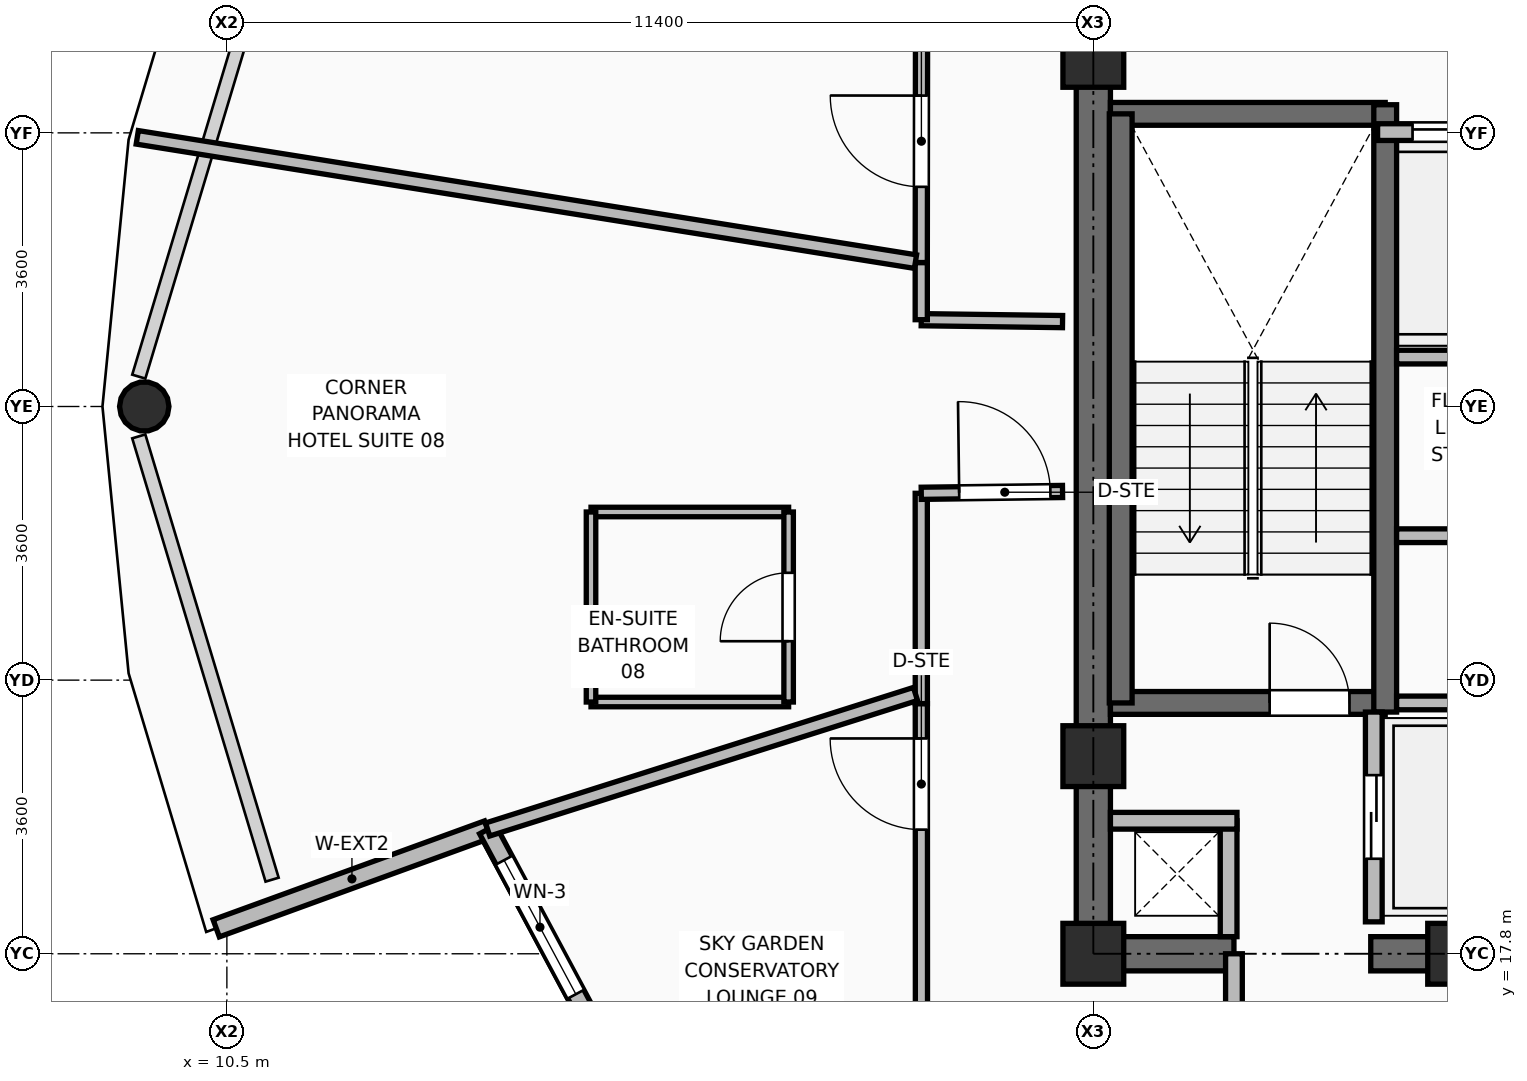
"""IFC4 building model, lengths in metres.
Left out: names, types, materials, properties, quantities, classifications, styles, units other than length and angle.
Written with IfcOpenShell. Run it as: python <this file> out.ifc"""

import sys

from ifc_helpers import new_model, si_unit, direction, frame, frame_2d, origin, origin_2d, place, context, subcontext, project, spatial, rectangle, hollow_circle, extrude, element, fill, save


model = new_model("IFC4")
c1 = context("Model", 3, precision=1e-05, world=origin(), true_north=direction((0.0, 1.0)))
c2 = subcontext(c1, "Body", "Model", "MODEL_VIEW")
j1 = project(units=[si_unit("LENGTHUNIT", "METRE"), si_unit("PLANEANGLEUNIT", "RADIAN")], contexts=[c1])
p1 = place(None, origin())
s1 = spatial("IfcSite", under=j1, at=p1, CompositionType="ELEMENT")
p2 = place(p1, origin())
s2 = spatial("IfcBuilding", under=s1, at=p2, CompositionType="ELEMENT")
p3 = place(p2, frame((0.0, 0.0, 216.15)))
s3 = spatial("IfcBuildingStorey", under=s2, at=p3, CompositionType="ELEMENT", Elevation=216.15)
for number, where, z_axis, x_axis in (
    (1, (21.9, 17.8, 0.0), (0.0, 0.0, 1.0), (1.0, 0.0, 0.0)),
    (2, (26.7, 17.8, 0.0), (0.0, 0.0, 1.0), (1.0, 0.0, 0.0)),
    (3, (21.9, 20.4, 0.0), (0.0, 0.0, 1.0), (1.0, 0.0, 0.0)),
    (4, (21.9, 29.6, 0.0), (0.0, 0.0, 1.0), (1.0, 0.0, 0.0)),
):
    element("IfcColumn", number, at=place(p3, frame(where, z_axis=z_axis, x_axis=x_axis)), inside=s3, PredefinedType="COLUMN", context=c2, shape_type="SweptSolid", body=[
        extrude(rectangle(XDim=0.8, YDim=0.8, at=origin_2d()), origin(), (0.0, 0.0, 1.0), 3.75),
    ])
p4 = place(p3, frame((9.413, 25.0, 0.0), z_axis=(0.020716335519, 0.0, 0.999785393693), x_axis=(0.0, 1.0, 0.0)))
e5 = element("IfcColumn", 5, at=p4, inside=s3, PredefinedType="COLUMN", context=c2, shape_type="SweptSolid", body=[
    extrude(hollow_circle(Radius=0.325, WallThickness=0.03, at=origin_2d()), origin(), (0.0, 0.0, 1.0), 3.571),
])
p5 = place(p3, frame((10.36, 18.135, 0.0), z_axis=(0.0, 0.0, 1.0), x_axis=(0.939660170892, 0.342109285519, 0.0)))
e6 = element("IfcWall", 6, at=p5, inside=s3, PredefinedType="SOLIDWALL", context=c2, shape_type="SweptSolid", body=[
    extrude(rectangle(XDim=3.8, YDim=0.24, at=frame_2d((1.9, 0.0))), origin(), (0.0, 0.0, 1.0), 3.57),
])
p6 = place(p3, frame((13.931, 19.435, 0.0), z_axis=(0.0, 0.0, 1.0), x_axis=(0.472181923686, -0.88150112362, 0.0)))
e7 = element("IfcWall", 7, at=p6, inside=s3, PredefinedType="SOLIDWALL", context=c2, shape_type="SweptSolid", body=[
    extrude(rectangle(XDim=2.917, YDim=0.24, at=frame_2d((1.458, 0.0))), origin(), (0.0, 0.0, 1.0), 3.57),
])
p7 = place(p6, frame((0.458, 0.0, 0.85)))
e8 = element("IfcOpeningElement", 8, at=p7, cuts=e7, PredefinedType="OPENING", context=c2, shape_type="SweptSolid", body=[
    extrude(rectangle(XDim=2.0, YDim=2.4, at=frame_2d((1.0, 1.2))), frame((0.0, 0.13, 0.0), z_axis=(0.0, -1.0, 0.0), x_axis=(1.0, 0.0, 0.0)), (0.0, 0.0, 1.0), 0.26),
])
p8 = place(p3, frame((21.675, 17.8, 0.0), z_axis=(0.0, 0.0, 1.0), x_axis=(1.0, 0.0, 0.0)))
e9 = element("IfcWall", 9, at=p8, inside=s3, PredefinedType="SHEAR", context=c2, shape_type="SweptSolid", body=[
    extrude(rectangle(XDim=2.075, YDim=0.45, at=frame_2d((1.038, 0.0))), origin(), (0.0, 0.0, 1.0), 3.57),
])
p9 = place(p3, frame((25.55, 17.8, 0.0), z_axis=(0.0, 0.0, 1.0), x_axis=(1.0, 0.0, 0.0)))
e10 = element("IfcWall", 10, at=p9, inside=s3, PredefinedType="SHEAR", context=c2, shape_type="SweptSolid", body=[
    extrude(rectangle(XDim=6.9, YDim=0.45, at=frame_2d((3.45, 0.0))), origin(), (0.0, 0.0, 1.0), 3.57),
])
p10 = place(p3, frame((21.9, 18.025, 0.0), z_axis=(0.0, 0.0, 1.0), x_axis=(0.0, 1.0, 0.0)))
e11 = element("IfcWall", 11, at=p10, inside=s3, PredefinedType="SHEAR", context=c2, shape_type="SweptSolid", body=[
    extrude(rectangle(XDim=14.2, YDim=0.45, at=frame_2d((7.1, 0.0))), origin(), (0.0, 0.0, 1.0), 3.57),
])
p11 = place(p3, frame((22.125, 21.1, 0.0), z_axis=(0.0, 0.0, 1.0), x_axis=(1.0, 0.0, 0.0)))
e12 = element("IfcWall", 12, at=p11, inside=s3, PredefinedType="SHEAR", context=c2, shape_type="SweptSolid", body=[
    extrude(rectangle(XDim=3.615, YDim=0.3, at=frame_2d((1.808, 0.0))), origin(), (0.0, 0.0, 1.0), 3.57),
])
p12 = place(p11, frame((2.095, 0.0, 0.0)))
e13 = element("IfcOpeningElement", 13, at=p12, cuts=e12, PredefinedType="OPENING", context=c2, shape_type="SweptSolid", body=[
    extrude(rectangle(XDim=1.05, YDim=2.1, at=frame_2d((0.525, 1.05))), frame((0.0, 0.16, 0.0), z_axis=(0.0, -1.0, 0.0), x_axis=(1.0, 0.0, 0.0)), (0.0, 0.0, 1.0), 0.32),
])
p13 = place(p3, frame((22.125, 28.85, 0.0), z_axis=(0.0, 0.0, 1.0), x_axis=(1.0, 0.0, 0.0)))
e14 = element("IfcWall", 14, at=p13, inside=s3, PredefinedType="SHEAR", context=c2, shape_type="SweptSolid", body=[
    extrude(rectangle(XDim=3.615, YDim=0.3, at=frame_2d((1.808, 0.0))), origin(), (0.0, 0.0, 1.0), 3.57),
])
p14 = place(p3, frame((25.74, 20.98, 0.0), z_axis=(0.0, 0.0, 1.0), x_axis=(0.0, 1.0, 0.0)))
e15 = element("IfcWall", 15, at=p14, inside=s3, PredefinedType="SHEAR", context=c2, shape_type="SweptSolid", body=[
    extrude(rectangle(XDim=7.99, YDim=0.3, at=frame_2d((3.995, 0.0))), origin(), (0.0, 0.0, 1.0), 3.57),
])
p15 = place(p3, frame((22.26, 21.1, 0.0), z_axis=(0.0, 0.0, 1.0), x_axis=(0.0, 1.0, 0.0)))
e16 = element("IfcWall", 16, at=p15, inside=s3, PredefinedType="SHEAR", context=c2, shape_type="SweptSolid", body=[
    extrude(rectangle(XDim=7.75, YDim=0.3, at=frame_2d((3.875, 0.0))), origin(), (0.0, 0.0, 1.0), 3.57),
])
p16 = place(p3, frame((23.68, 18.025, 0.0), z_axis=(0.0, 0.0, 1.0), x_axis=(0.0, 1.0, 0.0)))
e17 = element("IfcWall", 17, at=p16, inside=s3, PredefinedType="PARTITIONING", context=c2, shape_type="SweptSolid", body=[
    extrude(rectangle(XDim=1.525, YDim=0.22, at=frame_2d((0.763, 0.0))), origin(), (0.0, 0.0, 1.0), 3.55),
])
p17 = place(p3, frame((22.125, 19.55, 0.0), z_axis=(0.0, 0.0, 1.0), x_axis=(1.0, 0.0, 0.0)))
e18 = element("IfcWall", 18, at=p17, inside=s3, PredefinedType="PARTITIONING", context=c2, shape_type="SweptSolid", body=[
    extrude(rectangle(XDim=1.665, YDim=0.22, at=frame_2d((0.833, 0.0))), origin(), (0.0, 0.0, 1.0), 2.595),
])
p18 = place(p3, frame((25.59, 18.22, 0.0), z_axis=(0.0, 0.0, 1.0), x_axis=(0.0, 1.0, 0.0)))
e19 = element("IfcWall", 19, at=p18, inside=s3, PredefinedType="PARTITIONING", context=c2, shape_type="SweptSolid", body=[
    extrude(rectangle(XDim=2.76, YDim=0.22, at=frame_2d((1.38, 0.0))), origin(), (0.0, 0.0, 1.0), 3.55),
])
p19 = place(p18, frame((0.83, 0.0, 0.0)))
e20 = element("IfcOpeningElement", 20, at=p19, cuts=e19, PredefinedType="OPENING", context=c2, shape_type="SweptSolid", body=[
    extrude(rectangle(XDim=1.1, YDim=2.2, at=frame_2d((0.55, 1.1))), frame((0.0, 0.12, 0.0), z_axis=(0.0, -1.0, 0.0), x_axis=(1.0, 0.0, 0.0)), (0.0, 0.0, 1.0), 0.24),
])
p20 = place(p3, frame((25.64, 28.61, 0.0), z_axis=(0.0, 0.0, 1.0), x_axis=(1.0, 0.0, 0.0)))
e21 = element("IfcWall", 21, at=p20, inside=s3, PredefinedType="PARTITIONING", context=c2, shape_type="SweptSolid", body=[
    extrude(rectangle(XDim=2.02, YDim=0.22, at=frame_2d((1.01, 0.0))), origin(), (0.0, 0.0, 1.0), 3.55),
])
p21 = place(p20, frame((0.46, 0.0, 0.0)))
e22 = element("IfcOpeningElement", 22, at=p21, cuts=e21, PredefinedType="OPENING", context=c2, shape_type="SweptSolid", body=[
    extrude(rectangle(XDim=1.1, YDim=2.2, at=frame_2d((0.55, 1.1))), frame((0.0, 0.12, 0.0), z_axis=(0.0, -1.0, 0.0), x_axis=(1.0, 0.0, 0.0)), (0.0, 0.0, 1.0), 0.24),
])
for number, where, z_axis, x_axis in (
    (23, (25.89, 21.1, 0.0), (0.0, 0.0, 1.0), (1.0, 0.0, 0.0)),
    (24, (25.89, 25.65, 0.0), (0.0, 0.0, 1.0), (1.0, 0.0, 0.0)),
):
    element("IfcWall", number, at=place(p3, frame(where, z_axis=z_axis, x_axis=x_axis)), inside=s3, PredefinedType="PARTITIONING", context=c2, shape_type="SweptSolid", body=[
        extrude(rectangle(XDim=1.7, YDim=0.18, at=frame_2d((0.85, 0.0))), origin(), (0.0, 0.0, 1.0), 3.55),
    ])
p22 = place(p3, frame((25.89, 23.3, 0.0), z_axis=(0.0, 0.0, 1.0), x_axis=(1.0, 0.0, 0.0)))
e25 = element("IfcWall", 25, at=p22, inside=s3, PredefinedType="PARTITIONING", context=c2, shape_type="SweptSolid", body=[
    extrude(rectangle(XDim=1.79, YDim=0.18, at=frame_2d((0.895, 0.0))), origin(), (0.0, 0.0, 1.0), 3.55),
])
p23 = place(p3, frame((23.75, 14.35, 0.0), z_axis=(0.0, 0.0, 1.0), x_axis=(0.0, 1.0, 0.0)))
e26 = element("IfcWall", 26, at=p23, inside=s3, PredefinedType="PARTITIONING", context=c2, shape_type="SweptSolid", body=[
    extrude(rectangle(XDim=3.45, YDim=0.22, at=frame_2d((1.725, 0.0))), origin(), (0.0, 0.0, 1.0), 3.081),
])
p24 = place(p3, frame((21.495, 26.117, 0.0), z_axis=(0.0, 0.0, 1.0), x_axis=(-0.999908537082, 0.013524698532, 0.0)))
e27 = element("IfcWall", 27, at=p24, inside=s3, PredefinedType="PARTITIONING", context=c2, shape_type="SweptSolid", body=[
    extrude(rectangle(XDim=1.859, YDim=0.16, at=frame_2d((0.93, 0.0))), origin(), (0.0, 0.0, 1.0), 2.595),
])
p25 = place(p3, frame((19.636, 26.142, 0.0), z_axis=(0.0, 0.0, 1.0), x_axis=(0.0, 1.0, 0.0)))
e28 = element("IfcWall", 28, at=p25, inside=s3, PredefinedType="PARTITIONING", context=c2, shape_type="SweptSolid", body=[
    extrude(rectangle(XDim=0.752, YDim=0.16, at=frame_2d((0.376, 0.0))), origin(), (0.0, 0.0, 1.0), 3.55),
])
p26 = place(p3, frame((19.636, 26.894, 0.0), z_axis=(0.0, 0.0, 1.0), x_axis=(0.001172332137, 0.999999312818, 0.0)))
e29 = element("IfcWall", 29, at=p26, inside=s3, PredefinedType="PARTITIONING", context=c2, shape_type="SweptSolid", body=[
    extrude(rectangle(XDim=3.332, YDim=0.16, at=frame_2d((1.666, 0.0))), origin(), (0.0, 0.0, 1.0), 3.55),
])
p27 = place(p26, frame((0.996, 0.0, 0.0)))
e30 = element("IfcOpeningElement", 30, at=p27, cuts=e29, PredefinedType="OPENING", context=c2, shape_type="SweptSolid", body=[
    extrude(rectangle(XDim=1.2, YDim=2.1, at=frame_2d((0.6, 1.05))), frame((0.0, 0.09, 0.0), z_axis=(0.0, -1.0, 0.0), x_axis=(1.0, 0.0, 0.0)), (0.0, 0.0, 1.0), 0.18),
])
p28 = place(p3, frame((19.639, 15.545, 0.0), z_axis=(0.0, 0.0, 1.0), x_axis=(-0.000352159154, 0.999999937992, 0.0)))
e31 = element("IfcWall", 31, at=p28, inside=s3, PredefinedType="PARTITIONING", context=c2, shape_type="SweptSolid", body=[
    extrude(rectangle(XDim=5.546, YDim=0.16, at=frame_2d((2.773, 0.0))), origin(), (0.0, 0.0, 1.0), 3.081),
])
p29 = place(p28, frame((3.888, 0.0, 0.0)))
e32 = element("IfcOpeningElement", 32, at=p29, cuts=e31, PredefinedType="OPENING", context=c2, shape_type="SweptSolid", body=[
    extrude(rectangle(XDim=1.2, YDim=2.1, at=frame_2d((0.6, 1.05))), frame((0.0, 0.09, 0.0), z_axis=(0.0, -1.0, 0.0), x_axis=(1.0, 0.0, 0.0)), (0.0, 0.0, 1.0), 0.18),
])
p30 = place(p3, frame((19.637, 21.091, 0.0), z_axis=(0.0, 0.0, 1.0), x_axis=(-0.000352951535, 0.999999937713, 0.0)))
e33 = element("IfcWall", 33, at=p30, inside=s3, PredefinedType="PARTITIONING", context=c2, shape_type="SweptSolid", body=[
    extrude(rectangle(XDim=2.767, YDim=0.16, at=frame_2d((1.383, 0.0))), origin(), (0.0, 0.0, 1.0), 3.081),
])
p31 = place(p3, frame((19.636, 23.858, 0.0), z_axis=(0.0, 0.0, 1.0), x_axis=(0.999915502175, 0.012999558072, 0.0)))
e34 = element("IfcWall", 34, at=p31, inside=s3, PredefinedType="PARTITIONING", context=c2, shape_type="SweptSolid", body=[
    extrude(rectangle(XDim=1.859, YDim=0.16, at=frame_2d((0.93, 0.0))), origin(), (0.0, 0.0, 1.0), 2.595),
])
p32 = place(p31, frame((0.499, 0.0, 0.0)))
e35 = element("IfcOpeningElement", 35, at=p32, cuts=e34, PredefinedType="OPENING", context=c2, shape_type="SweptSolid", body=[
    extrude(rectangle(XDim=1.2, YDim=2.1, at=frame_2d((0.6, 1.05))), frame((0.0, 0.09, 0.0), z_axis=(0.0, -1.0, 0.0), x_axis=(1.0, 0.0, 0.0)), (0.0, 0.0, 1.0), 0.18),
])
p33 = place(p3, frame((19.56, 26.906, 0.0), z_axis=(0.0, 0.0, 1.0), x_axis=(-0.987489219608, 0.157686528141, 0.0)))
e36 = element("IfcWall", 36, at=p33, inside=s3, PredefinedType="PARTITIONING", context=c2, shape_type="SweptSolid", body=[
    extrude(rectangle(XDim=10.369, YDim=0.18, at=frame_2d((5.184, 0.0))), origin(), (0.0, 0.0, 1.0), 2.925),
])
p34 = place(p3, frame((19.56, 21.218, 0.0), z_axis=(0.0, 0.0, 1.0), x_axis=(-0.953322985511, -0.301952455358, 0.0)))
e37 = element("IfcWall", 37, at=p34, inside=s3, PredefinedType="PARTITIONING", context=c2, shape_type="SweptSolid", body=[
    extrude(rectangle(XDim=5.905, YDim=0.18, at=frame_2d((2.952, 0.0))), origin(), (0.0, 0.0, 1.0), 3.081),
])
for number, where, z_axis, x_axis in (
    (38, (15.291, 21.112, 0.0), (0.0, 0.0, 1.0), (1.0, 0.0, 0.0)),
    (39, (15.291, 23.612, 0.0), (0.0, 0.0, 1.0), (1.0, 0.0, 0.0)),
):
    element("IfcWall", number, at=place(p3, frame(where, z_axis=z_axis, x_axis=x_axis)), inside=s3, PredefinedType="PARTITIONING", context=c2, shape_type="SweptSolid", body=[
        extrude(rectangle(XDim=2.6, YDim=0.125, at=frame_2d((1.3, 0.0))), origin(), (0.0, 0.0, 1.0), 3.55),
    ])
p35 = place(p3, frame((15.291, 21.112, 0.0), z_axis=(0.0, 0.0, 1.0), x_axis=(0.0, 1.0, 0.0)))
e40 = element("IfcWall", 40, at=p35, inside=s3, PredefinedType="PARTITIONING", context=c2, shape_type="SweptSolid", body=[
    extrude(rectangle(XDim=2.5, YDim=0.125, at=frame_2d((1.25, 0.0))), origin(), (0.0, 0.0, 1.0), 3.081),
])
p36 = place(p3, frame((17.891, 21.112, 0.0), z_axis=(0.0, 0.0, 1.0), x_axis=(0.0, 1.0, 0.0)))
e41 = element("IfcWall", 41, at=p36, inside=s3, PredefinedType="PARTITIONING", context=c2, shape_type="SweptSolid", body=[
    extrude(rectangle(XDim=2.5, YDim=0.125, at=frame_2d((1.25, 0.0))), origin(), (0.0, 0.0, 1.0), 3.081),
])
p37 = place(p36, frame((0.8, 0.0, 0.0)))
e42 = element("IfcOpeningElement", 42, at=p37, cuts=e41, PredefinedType="OPENING", context=c2, shape_type="SweptSolid", body=[
    extrude(rectangle(XDim=0.9, YDim=2.1, at=frame_2d((0.45, 1.05))), frame((0.0, 0.073, 0.0), z_axis=(0.0, -1.0, 0.0), x_axis=(1.0, 0.0, 0.0)), (0.0, 0.0, 1.0), 0.145),
])
p38 = place(p7, origin())
e43 = element("IfcWindow", 43, at=p38, inside=s3, PartitioningType="SINGLE_PANEL", PredefinedType="WINDOW", context=c2, shape_type="SweptSolid", body=[
    extrude(rectangle(XDim=2.0, YDim=2.4, at=frame_2d((1.0, 1.2))), frame((0.0, 0.03, 0.0), z_axis=(0.0, -1.0, 0.0), x_axis=(1.0, 0.0, 0.0)), (0.0, 0.0, 1.0), 0.06),
])
fill(e8, e43)
p39 = place(p12, origin())
e44 = element("IfcDoor", 44, at=p39, inside=s3, OperationType="SINGLE_SWING_LEFT", PredefinedType="DOOR", context=c2, shape_type="SweptSolid", body=[
    extrude(rectangle(XDim=1.05, YDim=2.1, at=frame_2d((0.525, 1.05))), frame((0.0, 0.025, 0.0), z_axis=(0.0, -1.0, 0.0), x_axis=(1.0, 0.0, 0.0)), (0.0, 0.0, 1.0), 0.05),
])
fill(e13, e44)
p40 = place(p19, origin())
e45 = element("IfcDoor", 45, at=p40, inside=s3, OperationType="DOUBLE_DOOR_SLIDING", PredefinedType="DOOR", context=c2, shape_type="SweptSolid", body=[
    extrude(rectangle(XDim=1.1, YDim=2.2, at=frame_2d((0.55, 1.1))), frame((0.0, 0.025, 0.0), z_axis=(0.0, -1.0, 0.0), x_axis=(1.0, 0.0, 0.0)), (0.0, 0.0, 1.0), 0.05),
])
fill(e20, e45)
p41 = place(p21, origin())
e46 = element("IfcDoor", 46, at=p41, inside=s3, OperationType="DOUBLE_DOOR_SLIDING", PredefinedType="DOOR", context=c2, shape_type="SweptSolid", body=[
    extrude(rectangle(XDim=1.1, YDim=2.2, at=frame_2d((0.55, 1.1))), frame((0.0, 0.025, 0.0), z_axis=(0.0, -1.0, 0.0), x_axis=(1.0, 0.0, 0.0)), (0.0, 0.0, 1.0), 0.05),
])
fill(e22, e46)
p42 = place(p27, origin())
e47 = element("IfcDoor", 47, at=p42, inside=s3, OperationType="SINGLE_SWING_RIGHT", PredefinedType="DOOR", context=c2, shape_type="SweptSolid", body=[
    extrude(rectangle(XDim=1.2, YDim=2.1, at=frame_2d((0.6, 1.05))), frame((0.0, 0.025, 0.0), z_axis=(0.0, -1.0, 0.0), x_axis=(1.0, 0.0, 0.0)), (0.0, 0.0, 1.0), 0.05),
])
fill(e30, e47)
p43 = place(p37, origin())
e48 = element("IfcDoor", 48, at=p43, inside=s3, OperationType="SINGLE_SWING_LEFT", PredefinedType="DOOR", context=c2, shape_type="SweptSolid", body=[
    extrude(rectangle(XDim=0.9, YDim=2.1, at=frame_2d((0.45, 1.05))), frame((0.0, 0.025, 0.0), z_axis=(0.0, -1.0, 0.0), x_axis=(1.0, 0.0, 0.0)), (0.0, 0.0, 1.0), 0.05),
])
fill(e42, e48)
p44 = place(p32, origin())
e49 = element("IfcDoor", 49, at=p44, inside=s3, OperationType="SINGLE_SWING_LEFT", PredefinedType="DOOR", context=c2, shape_type="SweptSolid", body=[
    extrude(rectangle(XDim=1.2, YDim=2.1, at=frame_2d((0.6, 1.05))), frame((0.0, 0.025, 0.0), z_axis=(0.0, -1.0, 0.0), x_axis=(1.0, 0.0, 0.0)), (0.0, 0.0, 1.0), 0.05),
])
fill(e35, e49)
p45 = place(p29, origin())
e50 = element("IfcDoor", 50, at=p45, inside=s3, OperationType="SINGLE_SWING_RIGHT", PredefinedType="DOOR", context=c2, shape_type="SweptSolid", body=[
    extrude(rectangle(XDim=1.2, YDim=2.1, at=frame_2d((0.6, 1.05))), frame((0.0, 0.025, 0.0), z_axis=(0.0, -1.0, 0.0), x_axis=(1.0, 0.0, 0.0)), (0.0, 0.0, 1.0), 0.05),
])
fill(e32, e50)
save(model, sys.argv[1])
